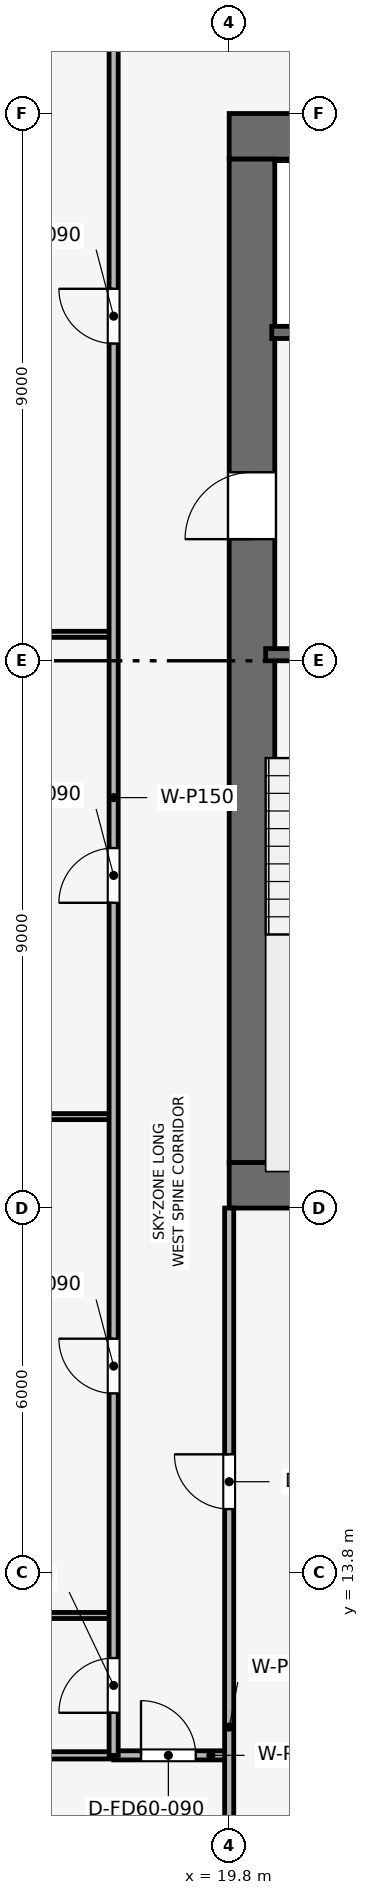
"""IFC4 building model, lengths in metres.
Left out: names, types, materials, properties, quantities, classifications, styles, units other than length and angle.
Written with IfcOpenShell. Run it as: python <this file> out.ifc"""

import sys

from ifc_helpers import new_model, si_unit, direction, frame, frame_2d, origin, place, context, subcontext, project, spatial, rectangle, extrude, element, fill, save


model = new_model("IFC4")
c1 = context("Model", 3, precision=1e-05, world=origin(), true_north=direction((0.0, 1.0)))
c2 = subcontext(c1, "Body", "Model", "MODEL_VIEW")
j1 = project(units=[si_unit("LENGTHUNIT", "METRE"), si_unit("PLANEANGLEUNIT", "RADIAN")], contexts=[c1])
p1 = place(None, origin())
s1 = spatial("IfcSite", under=j1, at=p1, CompositionType="ELEMENT")
p2 = place(p1, origin())
s2 = spatial("IfcBuilding", under=s1, at=p2, CompositionType="ELEMENT")
p3 = place(p2, frame((0.0, 0.0, 257.85)))
s3 = spatial("IfcBuildingStorey", under=s2, at=p3, CompositionType="ELEMENT", Elevation=257.85)
p4 = place(p3, frame((19.8, 20.175, 0.0), z_axis=(0.0, 0.0, 1.0), x_axis=(1.0, 0.0, 0.0)))
e1 = element("IfcWall", 1, at=p4, inside=s3, PredefinedType="SHEAR", context=c2, shape_type="SweptSolid", body=[
    extrude(rectangle(XDim=18.0, YDim=0.75, at=frame_2d((9.0, 0.0))), origin(), (0.0, 0.0, 1.0), 3.75),
])
p5 = place(p3, frame((19.8, 37.425, 0.0), z_axis=(0.0, 0.0, 1.0), x_axis=(1.0, 0.0, 0.0)))
e2 = element("IfcWall", 2, at=p5, inside=s3, PredefinedType="SHEAR", context=c2, shape_type="SweptSolid", body=[
    extrude(rectangle(XDim=18.0, YDim=0.75, at=frame_2d((9.0, 0.0))), origin(), (0.0, 0.0, 1.0), 3.75),
])
p6 = place(p5, frame((7.05, 0.0, 0.0)))
e3 = element("IfcOpeningElement", 3, at=p6, cuts=e2, PredefinedType="OPENING", context=c2, shape_type="SweptSolid", body=[
    extrude(rectangle(XDim=1.1, YDim=2.15, at=frame_2d((0.55, 1.075))), frame((0.0, 0.385, 0.0), z_axis=(0.0, -1.0, 0.0), x_axis=(1.0, 0.0, 0.0)), (0.0, 0.0, 1.0), 0.77),
])
p7 = place(p3, frame((20.175, 20.55, 0.0), z_axis=(0.0, 0.0, 1.0), x_axis=(0.0, 1.0, 0.0)))
e4 = element("IfcWall", 4, at=p7, inside=s3, PredefinedType="SHEAR", context=c2, shape_type="SweptSolid", body=[
    extrude(rectangle(XDim=16.5, YDim=0.75, at=frame_2d((8.25, 0.0))), origin(), (0.0, 0.0, 1.0), 3.75),
])
p8 = place(p7, frame((10.25, 0.0, 0.0)))
e5 = element("IfcOpeningElement", 5, at=p8, cuts=e4, PredefinedType="OPENING", context=c2, shape_type="SweptSolid", body=[
    extrude(rectangle(XDim=1.1, YDim=2.15, at=frame_2d((0.55, 1.075))), frame((0.0, 0.385, 0.0), z_axis=(0.0, -1.0, 0.0), x_axis=(1.0, 0.0, 0.0)), (0.0, 0.0, 1.0), 0.77),
])
p9 = place(p3, frame((20.4, 28.9, 0.0), z_axis=(0.0, 0.0, 1.0), x_axis=(1.0, 0.0, 0.0)))
e6 = element("IfcWall", 6, at=p9, inside=s3, PredefinedType="SHEAR", context=c2, shape_type="SweptSolid", body=[
    extrude(rectangle(XDim=3.15, YDim=0.2, at=frame_2d((1.575, 0.0))), origin(), (0.0, 0.0, 1.0), 3.5),
])
p10 = place(p9, frame((0.8, 0.0, 0.0)))
e7 = element("IfcOpeningElement", 7, at=p10, cuts=e6, PredefinedType="OPENING", context=c2, shape_type="SweptSolid", body=[
    extrude(rectangle(XDim=1.0, YDim=2.1, at=frame_2d((0.5, 1.05))), frame((0.0, 0.11, 0.0), z_axis=(0.0, -1.0, 0.0), x_axis=(1.0, 0.0, 0.0)), (0.0, 0.0, 1.0), 0.22),
])
p11 = place(p3, frame((20.5, 34.2, 0.0), z_axis=(0.0, 0.0, 1.0), x_axis=(1.0, 0.0, 0.0)))
e8 = element("IfcWall", 8, at=p11, inside=s3, PredefinedType="SHEAR", context=c2, shape_type="SweptSolid", body=[
    extrude(rectangle(XDim=3.05, YDim=0.2, at=frame_2d((1.525, 0.0))), origin(), (0.0, 0.0, 1.0), 3.5),
])
p12 = place(p11, frame((0.75, 0.0, 0.0)))
e9 = element("IfcOpeningElement", 9, at=p12, cuts=e8, PredefinedType="OPENING", context=c2, shape_type="SweptSolid", body=[
    extrude(rectangle(XDim=1.1, YDim=2.15, at=frame_2d((0.55, 1.075))), frame((0.0, 0.11, 0.0), z_axis=(0.0, -1.0, 0.0), x_axis=(1.0, 0.0, 0.0)), (0.0, 0.0, 1.0), 0.22),
])
for number, where, z_axis, x_axis in (
    (10, (4.03, 13.1, 0.0), (0.0, 0.0, 1.0), (1.0, 0.0, 0.0)),
    (11, (4.03, 21.304, 0.0), (0.0, 0.0, 1.0), (1.0, 0.0, 0.0)),
    (12, (4.03, 29.235, 0.0), (0.0, 0.0, 1.0), (1.0, 0.0, 0.0)),
):
    element("IfcWall", number, at=place(p3, frame(where, z_axis=z_axis, x_axis=x_axis)), inside=s3, PredefinedType="MOVABLE", context=c2, shape_type="SweptSolid", body=[
        extrude(rectangle(XDim=13.87, YDim=0.1, at=frame_2d((6.935, 0.0))), origin(), (0.0, 0.0, 1.0), 3.085),
    ])
p13 = place(p3, frame((10.8, 10.8, 0.0), z_axis=(0.0, 0.0, 1.0), x_axis=(1.0, 0.0, 0.0)))
e13 = element("IfcWall", 13, at=p13, inside=s3, PredefinedType="PARTITIONING", context=c2, shape_type="SweptSolid", body=[
    extrude(rectangle(XDim=7.1, YDim=0.12, at=frame_2d((3.55, 0.0))), origin(), (0.0, 0.0, 1.0), 3.085),
])
p14 = place(p3, frame((17.9, 10.8, 0.0), z_axis=(0.0, 0.0, 1.0), x_axis=(1.0, 0.0, 0.0)))
e14 = element("IfcWall", 14, at=p14, inside=s3, PredefinedType="PARTITIONING", context=c2, shape_type="SweptSolid", body=[
    extrude(rectangle(XDim=1.9, YDim=0.15, at=frame_2d((0.95, 0.0))), origin(), (0.0, 0.0, 1.0), 3.5),
])
p15 = place(p14, frame((0.45, 0.0, 0.0)))
e15 = element("IfcOpeningElement", 15, at=p15, cuts=e14, PredefinedType="OPENING", context=c2, shape_type="SweptSolid", body=[
    extrude(rectangle(XDim=0.9, YDim=2.1, at=frame_2d((0.45, 1.05))), frame((0.0, 0.085, 0.0), z_axis=(0.0, -1.0, 0.0), x_axis=(1.0, 0.0, 0.0)), (0.0, 0.0, 1.0), 0.17),
])
p16 = place(p3, frame((19.8, 4.03, 0.0), z_axis=(0.0, 0.0, 1.0), x_axis=(0.0, 1.0, 0.0)))
e16 = element("IfcWall", 16, at=p16, inside=s3, PredefinedType="PARTITIONING", context=c2, shape_type="SweptSolid", body=[
    extrude(rectangle(XDim=15.77, YDim=0.15, at=frame_2d((7.885, 0.0))), origin(), (0.0, 0.0, 1.0), 3.085),
])
p17 = place(p16, frame((10.82, 0.0, 0.0)))
e17 = element("IfcOpeningElement", 17, at=p17, cuts=e16, PredefinedType="OPENING", context=c2, shape_type="SweptSolid", body=[
    extrude(rectangle(XDim=0.9, YDim=2.1, at=frame_2d((0.45, 1.05))), frame((0.0, 0.085, 0.0), z_axis=(0.0, -1.0, 0.0), x_axis=(1.0, 0.0, 0.0)), (0.0, 0.0, 1.0), 0.17),
])
p18 = place(p3, frame((17.9, 10.8, 0.0), z_axis=(0.0, 0.0, 1.0), x_axis=(0.0, 1.0, 0.0)))
e18 = element("IfcWall", 18, at=p18, inside=s3, PredefinedType="PARTITIONING", context=c2, shape_type="SweptSolid", body=[
    extrude(rectangle(XDim=28.9, YDim=0.15, at=frame_2d((14.45, 0.0))), origin(), (0.0, 0.0, 1.0), 3.085),
])
p19 = place(p18, frame((0.7, 0.0, 0.0)))
e19 = element("IfcOpeningElement", 19, at=p19, cuts=e18, PredefinedType="OPENING", context=c2, shape_type="SweptSolid", body=[
    extrude(rectangle(XDim=0.9, YDim=2.1, at=frame_2d((0.45, 1.05))), frame((0.0, 0.085, 0.0), z_axis=(0.0, -1.0, 0.0), x_axis=(1.0, 0.0, 0.0)), (0.0, 0.0, 1.0), 0.17),
])
p20 = place(p18, frame((5.952, 0.0, 0.0)))
e20 = element("IfcOpeningElement", 20, at=p20, cuts=e18, PredefinedType="OPENING", context=c2, shape_type="SweptSolid", body=[
    extrude(rectangle(XDim=0.9, YDim=2.1, at=frame_2d((0.45, 1.05))), frame((0.0, 0.085, 0.0), z_axis=(0.0, -1.0, 0.0), x_axis=(1.0, 0.0, 0.0)), (0.0, 0.0, 1.0), 0.17),
])
p21 = place(p18, frame((14.02, 0.0, 0.0)))
e21 = element("IfcOpeningElement", 21, at=p21, cuts=e18, PredefinedType="OPENING", context=c2, shape_type="SweptSolid", body=[
    extrude(rectangle(XDim=0.9, YDim=2.1, at=frame_2d((0.45, 1.05))), frame((0.0, 0.085, 0.0), z_axis=(0.0, -1.0, 0.0), x_axis=(1.0, 0.0, 0.0)), (0.0, 0.0, 1.0), 0.17),
])
p22 = place(p18, frame((23.217, 0.0, 0.0)))
e22 = element("IfcOpeningElement", 22, at=p22, cuts=e18, PredefinedType="OPENING", context=c2, shape_type="SweptSolid", body=[
    extrude(rectangle(XDim=0.9, YDim=2.1, at=frame_2d((0.45, 1.05))), frame((0.0, 0.085, 0.0), z_axis=(0.0, -1.0, 0.0), x_axis=(1.0, 0.0, 0.0)), (0.0, 0.0, 1.0), 0.17),
])
p23 = place(p15, origin())
e23 = element("IfcDoor", 23, at=p23, inside=s3, OperationType="SINGLE_SWING_LEFT", PredefinedType="DOOR", context=c2, shape_type="SweptSolid", body=[
    extrude(rectangle(XDim=0.9, YDim=2.1, at=frame_2d((0.45, 1.05))), frame((0.0, 0.025, 0.0), z_axis=(0.0, -1.0, 0.0), x_axis=(1.0, 0.0, 0.0)), (0.0, 0.0, 1.0), 0.05),
])
fill(e15, e23)
p24 = place(p17, origin())
e24 = element("IfcDoor", 24, at=p24, inside=s3, OperationType="SINGLE_SWING_RIGHT", PredefinedType="DOOR", context=c2, shape_type="SweptSolid", body=[
    extrude(rectangle(XDim=0.9, YDim=2.1, at=frame_2d((0.45, 1.05))), frame((0.0, 0.025, 0.0), z_axis=(0.0, -1.0, 0.0), x_axis=(1.0, 0.0, 0.0)), (0.0, 0.0, 1.0), 0.05),
])
fill(e17, e24)
p25 = place(p19, origin())
e25 = element("IfcDoor", 25, at=p25, inside=s3, OperationType="SINGLE_SWING_LEFT", PredefinedType="DOOR", context=c2, shape_type="SweptSolid", body=[
    extrude(rectangle(XDim=0.9, YDim=2.1, at=frame_2d((0.45, 1.05))), frame((0.0, 0.025, 0.0), z_axis=(0.0, -1.0, 0.0), x_axis=(1.0, 0.0, 0.0)), (0.0, 0.0, 1.0), 0.05),
])
fill(e19, e25)
p26 = place(p20, origin())
e26 = element("IfcDoor", 26, at=p26, inside=s3, OperationType="SINGLE_SWING_RIGHT", PredefinedType="DOOR", context=c2, shape_type="SweptSolid", body=[
    extrude(rectangle(XDim=0.9, YDim=2.1, at=frame_2d((0.45, 1.05))), frame((0.0, 0.025, 0.0), z_axis=(0.0, -1.0, 0.0), x_axis=(1.0, 0.0, 0.0)), (0.0, 0.0, 1.0), 0.05),
])
fill(e20, e26)
p27 = place(p21, origin())
e27 = element("IfcDoor", 27, at=p27, inside=s3, OperationType="SINGLE_SWING_LEFT", PredefinedType="DOOR", context=c2, shape_type="SweptSolid", body=[
    extrude(rectangle(XDim=0.9, YDim=2.1, at=frame_2d((0.45, 1.05))), frame((0.0, 0.025, 0.0), z_axis=(0.0, -1.0, 0.0), x_axis=(1.0, 0.0, 0.0)), (0.0, 0.0, 1.0), 0.05),
])
fill(e21, e27)
p28 = place(p22, origin())
e28 = element("IfcDoor", 28, at=p28, inside=s3, OperationType="SINGLE_SWING_RIGHT", PredefinedType="DOOR", context=c2, shape_type="SweptSolid", body=[
    extrude(rectangle(XDim=0.9, YDim=2.1, at=frame_2d((0.45, 1.05))), frame((0.0, 0.025, 0.0), z_axis=(0.0, -1.0, 0.0), x_axis=(1.0, 0.0, 0.0)), (0.0, 0.0, 1.0), 0.05),
])
fill(e22, e28)
p29 = place(p8, origin())
e29 = element("IfcDoor", 29, at=p29, inside=s3, OperationType="SINGLE_SWING_LEFT", PredefinedType="DOOR", context=c2, shape_type="SweptSolid", body=[
    extrude(rectangle(XDim=1.1, YDim=2.15, at=frame_2d((0.55, 1.075))), frame((0.0, 0.025, 0.0), z_axis=(0.0, -1.0, 0.0), x_axis=(1.0, 0.0, 0.0)), (0.0, 0.0, 1.0), 0.05),
])
fill(e5, e29)
save(model, sys.argv[1])
